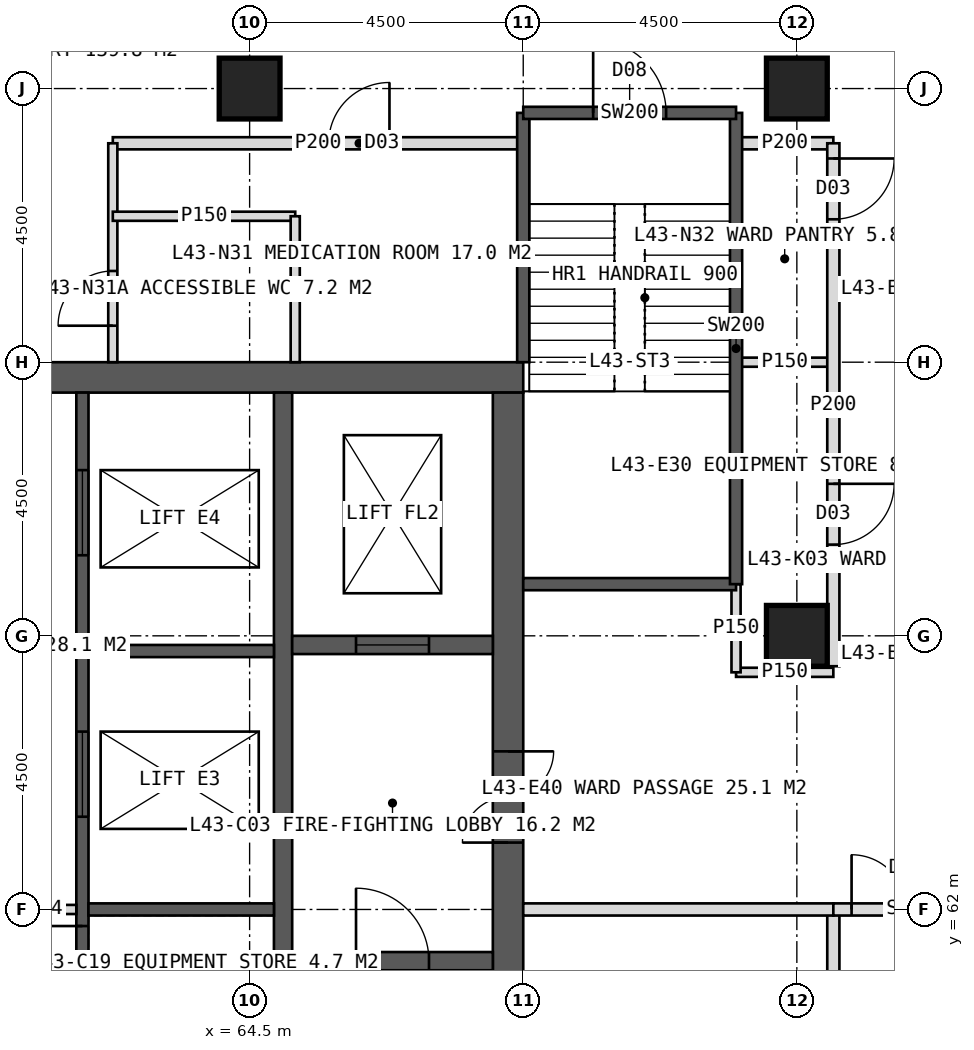
"""IFC4 building model, lengths in metres.
Left out: names, types, materials, properties, quantities, classifications, styles, units other than length and angle.
Written with IfcOpenShell. Run it as: python <this file> out.ifc"""

import sys

from ifc_helpers import new_model, si_unit, direction, frame, frame_2d, origin, origin_2d, place, context, subcontext, project, spatial, rectangle, hollow_rectangle, extrude, element, fill, save


model = new_model("IFC4")
c1 = context("Model", 3, precision=1e-05, world=origin(), true_north=direction((0.0, 1.0)))
c2 = subcontext(c1, "Body", "Model", "MODEL_VIEW")
j1 = project(units=[si_unit("LENGTHUNIT", "METRE"), si_unit("PLANEANGLEUNIT", "RADIAN")], contexts=[c1])
p1 = place(None, origin())
s1 = spatial("IfcSite", under=j1, at=p1, CompositionType="ELEMENT")
p2 = place(p1, origin())
s2 = spatial("IfcBuilding", under=s1, at=p2, CompositionType="ELEMENT")
p3 = place(p2, frame((0.0, 0.0, 181.0)))
s3 = spatial("IfcBuildingStorey", under=s2, at=p3, CompositionType="ELEMENT", Elevation=181.0)
p4 = place(p3, frame((51.0, 70.75, 0.0), z_axis=(0.0, 0.0, 1.0), x_axis=(1.0, 0.0, 0.0)))
e1 = element("IfcWall", 1, at=p4, inside=s3, PredefinedType="SHEAR", context=c2, shape_type="SweptSolid", body=[
    extrude(rectangle(XDim=18.0, YDim=0.5, at=frame_2d((9.0, 0.0))), origin(), (0.0, 0.0, 1.0), 4.0),
])
p5 = place(p4, frame((8.1, 0.0, 0.0)))
e2 = element("IfcOpeningElement", 2, at=p5, cuts=e1, PredefinedType="OPENING", context=c2, shape_type="SweptSolid", body=[
    extrude(rectangle(XDim=1.8, YDim=2.2, at=frame_2d((0.9, 1.1))), frame((0.0, 0.26, 0.0), z_axis=(0.0, -1.0, 0.0), x_axis=(1.0, 0.0, 0.0)), (0.0, 0.0, 1.0), 0.52),
])
p6 = place(p3, frame((68.75, 53.5, 0.0), z_axis=(0.0, 0.0, 1.0), x_axis=(0.0, 1.0, 0.0)))
e3 = element("IfcWall", 3, at=p6, inside=s3, PredefinedType="SHEAR", context=c2, shape_type="SweptSolid", body=[
    extrude(rectangle(XDim=17.0, YDim=0.5, at=frame_2d((8.5, 0.0))), origin(), (0.0, 0.0, 1.0), 4.0),
])
p7 = place(p6, frame((9.6, 0.0, 0.0)))
e4 = element("IfcOpeningElement", 4, at=p7, cuts=e3, PredefinedType="OPENING", context=c2, shape_type="SweptSolid", body=[
    extrude(rectangle(XDim=1.5, YDim=2.2, at=frame_2d((0.75, 1.1))), frame((0.0, 0.26, 0.0), z_axis=(0.0, -1.0, 0.0), x_axis=(1.0, 0.0, 0.0)), (0.0, 0.0, 1.0), 0.52),
])
p8 = place(p3, frame((65.05, 53.5, 0.0), z_axis=(0.0, 0.0, 1.0), x_axis=(0.0, 1.0, 0.0)))
e5 = element("IfcWall", 5, at=p8, inside=s3, PredefinedType="SHEAR", context=c2, shape_type="SweptSolid", body=[
    extrude(rectangle(XDim=17.0, YDim=0.3, at=frame_2d((8.5, 0.0))), origin(), (0.0, 0.0, 1.0), 4.0),
])
p9 = place(p3, frame((61.75, 53.5, 0.0), z_axis=(0.0, 0.0, 1.0), x_axis=(0.0, 1.0, 0.0)))
e6 = element("IfcWall", 6, at=p9, inside=s3, PredefinedType="SHEAR", context=c2, shape_type="SweptSolid", body=[
    extrude(rectangle(XDim=17.0, YDim=0.2, at=frame_2d((8.5, 0.0))), origin(), (0.0, 0.0, 1.0), 4.0),
])
p10 = place(p9, frame((0.393, 0.0, 0.0)))
e7 = element("IfcOpeningElement", 7, at=p10, cuts=e6, PredefinedType="OPENING", context=c2, shape_type="SweptSolid", body=[
    extrude(rectangle(XDim=1.0, YDim=2.1, at=frame_2d((0.5, 1.05))), frame((0.0, 0.11, 0.0), z_axis=(0.0, -1.0, 0.0), x_axis=(1.0, 0.0, 0.0)), (0.0, 0.0, 1.0), 0.22),
])
p11 = place(p9, frame((2.542, 0.0, 0.0)))
e8 = element("IfcOpeningElement", 8, at=p11, cuts=e6, PredefinedType="OPENING", context=c2, shape_type="SweptSolid", body=[
    extrude(rectangle(XDim=1.0, YDim=2.1, at=frame_2d((0.5, 1.05))), frame((0.0, 0.11, 0.0), z_axis=(0.0, -1.0, 0.0), x_axis=(1.0, 0.0, 0.0)), (0.0, 0.0, 1.0), 0.22),
])
p12 = place(p9, frame((5.127, 0.0, 0.0)))
e9 = element("IfcOpeningElement", 9, at=p12, cuts=e6, PredefinedType="OPENING", context=c2, shape_type="SweptSolid", body=[
    extrude(rectangle(XDim=1.0, YDim=2.1, at=frame_2d((0.5, 1.05))), frame((0.0, 0.11, 0.0), z_axis=(0.0, -1.0, 0.0), x_axis=(1.0, 0.0, 0.0)), (0.0, 0.0, 1.0), 0.22),
])
p13 = place(p9, frame((7.228, 0.0, 0.0)))
e10 = element("IfcOpeningElement", 10, at=p13, cuts=e6, PredefinedType="OPENING", context=c2, shape_type="SweptSolid", body=[
    extrude(rectangle(XDim=1.0, YDim=2.1, at=frame_2d((0.5, 1.05))), frame((0.0, 0.11, 0.0), z_axis=(0.0, -1.0, 0.0), x_axis=(1.0, 0.0, 0.0)), (0.0, 0.0, 1.0), 0.22),
])
p14 = place(p9, frame((10.025, 0.0, 0.0)))
e11 = element("IfcOpeningElement", 11, at=p14, cuts=e6, PredefinedType="OPENING", context=c2, shape_type="SweptSolid", body=[
    extrude(rectangle(XDim=1.4, YDim=2.2, at=frame_2d((0.7, 1.1))), frame((0.0, 0.11, 0.0), z_axis=(0.0, -1.0, 0.0), x_axis=(1.0, 0.0, 0.0)), (0.0, 0.0, 1.0), 0.22),
])
p15 = place(p9, frame((14.325, 0.0, 0.0)))
e12 = element("IfcOpeningElement", 12, at=p15, cuts=e6, PredefinedType="OPENING", context=c2, shape_type="SweptSolid", body=[
    extrude(rectangle(XDim=1.4, YDim=2.2, at=frame_2d((0.7, 1.1))), frame((0.0, 0.11, 0.0), z_axis=(0.0, -1.0, 0.0), x_axis=(1.0, 0.0, 0.0)), (0.0, 0.0, 1.0), 0.22),
])
for number, where, z_axis, x_axis in (
    (13, (61.85, 62.0, 0.0), (0.0, 0.0, 1.0), (1.0, 0.0, 0.0)),
    (14, (61.85, 66.25, 0.0), (0.0, 0.0, 1.0), (1.0, 0.0, 0.0)),
):
    element("IfcWall", number, at=place(p3, frame(where, z_axis=z_axis, x_axis=x_axis)), inside=s3, PredefinedType="SHEAR", context=c2, shape_type="SweptSolid", body=[
        extrude(rectangle(XDim=3.05, YDim=0.2, at=frame_2d((1.525, 0.0))), origin(), (0.0, 0.0, 1.0), 4.0),
    ])
p16 = place(p3, frame((65.2, 61.15, 0.0), z_axis=(0.0, 0.0, 1.0), x_axis=(1.0, 0.0, 0.0)))
e15 = element("IfcWall", 15, at=p16, inside=s3, PredefinedType="SHEAR", context=c2, shape_type="SweptSolid", body=[
    extrude(rectangle(XDim=3.3, YDim=0.3, at=frame_2d((1.65, 0.0))), origin(), (0.0, 0.0, 1.0), 4.0),
])
p17 = place(p16, frame((1.05, 0.0, 0.0)))
e16 = element("IfcOpeningElement", 16, at=p17, cuts=e15, PredefinedType="OPENING", context=c2, shape_type="SweptSolid", body=[
    extrude(rectangle(XDim=1.2, YDim=2.1, at=frame_2d((0.6, 1.05))), frame((0.0, 0.16, 0.0), z_axis=(0.0, -1.0, 0.0), x_axis=(1.0, 0.0, 0.0)), (0.0, 0.0, 1.0), 0.32),
])
p18 = place(p3, frame((65.2, 66.35, 0.0), z_axis=(0.0, 0.0, 1.0), x_axis=(1.0, 0.0, 0.0)))
e17 = element("IfcWall", 17, at=p18, inside=s3, PredefinedType="SHEAR", context=c2, shape_type="SweptSolid", body=[
    extrude(rectangle(XDim=3.3, YDim=0.3, at=frame_2d((1.65, 0.0))), origin(), (0.0, 0.0, 1.0), 4.0),
])
p19 = place(p18, frame((1.05, 0.0, 0.0)))
e18 = element("IfcOpeningElement", 18, at=p19, cuts=e17, PredefinedType="OPENING", context=c2, shape_type="SweptSolid", body=[
    extrude(rectangle(XDim=1.2, YDim=2.2, at=frame_2d((0.6, 1.1))), frame((0.0, 0.16, 0.0), z_axis=(0.0, -1.0, 0.0), x_axis=(1.0, 0.0, 0.0)), (0.0, 0.0, 1.0), 0.32),
])
for number, where, z_axis, x_axis in (
    (19, (73.5, 75.5, 0.0), (0.0, 0.0, 1.0), (1.0, 0.0, 0.0)),
    (20, (64.5, 75.5, 0.0), (0.0, 0.0, 1.0), (1.0, 0.0, 0.0)),
    (21, (73.5, 66.5, 0.0), (0.0, 0.0, 1.0), (1.0, 0.0, 0.0)),
):
    element("IfcColumn", number, at=place(p3, frame(where, z_axis=z_axis, x_axis=x_axis)), inside=s3, PredefinedType="COLUMN", context=c2, shape_type="SweptSolid", body=[
        extrude(hollow_rectangle(XDim=1.0, YDim=1.0, WallThickness=0.1, at=origin_2d()), origin(), (0.0, 0.0, 1.0), 4.0),
    ])
p20 = place(p3, frame((62.25, 74.6, 0.0), z_axis=(0.0, 0.0, 1.0), x_axis=(1.0, 0.0, 0.0)))
e22 = element("IfcWall", 22, at=p20, inside=s3, PredefinedType="PARTITIONING", context=c2, shape_type="SweptSolid", body=[
    extrude(rectangle(XDim=6.75, YDim=0.2, at=frame_2d((3.375, 0.0))), origin(), (0.0, 0.0, 1.0), 3.75),
])
p21 = place(p20, frame((3.55, 0.0, 0.0)))
e23 = element("IfcOpeningElement", 23, at=p21, cuts=e22, PredefinedType="OPENING", context=c2, shape_type="SweptSolid", body=[
    extrude(rectangle(XDim=1.0, YDim=2.1, at=frame_2d((0.5, 1.05))), frame((0.0, 0.11, 0.0), z_axis=(0.0, -1.0, 0.0), x_axis=(1.0, 0.0, 0.0)), (0.0, 0.0, 1.0), 0.22),
])
p22 = place(p3, frame((72.5, 74.6, 0.0), z_axis=(0.0, 0.0, 1.0), x_axis=(1.0, 0.0, 0.0)))
e24 = element("IfcWall", 24, at=p22, inside=s3, PredefinedType="PARTITIONING", context=c2, shape_type="SweptSolid", body=[
    extrude(rectangle(XDim=1.6, YDim=0.2, at=frame_2d((0.8, 0.0))), origin(), (0.0, 0.0, 1.0), 3.75),
])
p23 = place(p3, frame((62.25, 71.0, 0.0), z_axis=(0.0, 0.0, 1.0), x_axis=(0.0, 1.0, 0.0)))
e25 = element("IfcWall", 25, at=p23, inside=s3, PredefinedType="PARTITIONING", context=c2, shape_type="SweptSolid", body=[
    extrude(rectangle(XDim=3.6, YDim=0.15, at=frame_2d((1.8, 0.0))), origin(), (0.0, 0.0, 1.0), 3.75),
])
p24 = place(p23, frame((0.6, 0.0, 0.0)))
e26 = element("IfcOpeningElement", 26, at=p24, cuts=e25, PredefinedType="OPENING", context=c2, shape_type="SweptSolid", body=[
    extrude(rectangle(XDim=0.9, YDim=2.1, at=frame_2d((0.45, 1.05))), frame((0.0, 0.085, 0.0), z_axis=(0.0, -1.0, 0.0), x_axis=(1.0, 0.0, 0.0)), (0.0, 0.0, 1.0), 0.17),
])
p25 = place(p3, frame((62.25, 73.4, 0.0), z_axis=(0.0, 0.0, 1.0), x_axis=(1.0, 0.0, 0.0)))
e27 = element("IfcWall", 27, at=p25, inside=s3, PredefinedType="PARTITIONING", context=c2, shape_type="SweptSolid", body=[
    extrude(rectangle(XDim=3.0, YDim=0.15, at=frame_2d((1.5, 0.0))), origin(), (0.0, 0.0, 1.0), 3.75),
])
p26 = place(p3, frame((65.25, 71.0, 0.0), z_axis=(0.0, 0.0, 1.0), x_axis=(0.0, 1.0, 0.0)))
e28 = element("IfcWall", 28, at=p26, inside=s3, PredefinedType="PARTITIONING", context=c2, shape_type="SweptSolid", body=[
    extrude(rectangle(XDim=2.4, YDim=0.15, at=frame_2d((1.2, 0.0))), origin(), (0.0, 0.0, 1.0), 3.75),
])
p27 = place(p3, frame((72.5, 71.0, 0.0), z_axis=(0.0, 0.0, 1.0), x_axis=(1.0, 0.0, 0.0)))
e29 = element("IfcWall", 29, at=p27, inside=s3, PredefinedType="PARTITIONING", context=c2, shape_type="SweptSolid", body=[
    extrude(rectangle(XDim=1.6, YDim=0.15, at=frame_2d((0.8, 0.0))), origin(), (0.0, 0.0, 1.0), 3.75),
])
p28 = place(p3, frame((74.1, 74.6, 0.0), z_axis=(0.0, 0.0, 1.0), x_axis=(0.0, -1.0, 0.0)))
e30 = element("IfcWall", 30, at=p28, inside=s3, PredefinedType="PARTITIONING", context=c2, shape_type="SweptSolid", body=[
    extrude(rectangle(XDim=8.6, YDim=0.2, at=frame_2d((4.3, 0.0))), origin(), (0.0, 0.0, 1.0), 3.75),
])
p29 = place(p28, frame((0.25, 0.0, 0.0)))
e31 = element("IfcOpeningElement", 31, at=p29, cuts=e30, PredefinedType="OPENING", context=c2, shape_type="SweptSolid", body=[
    extrude(rectangle(XDim=1.0, YDim=2.1, at=frame_2d((0.5, 1.05))), frame((0.0, 0.11, 0.0), z_axis=(0.0, -1.0, 0.0), x_axis=(1.0, 0.0, 0.0)), (0.0, 0.0, 1.0), 0.22),
])
p30 = place(p28, frame((5.6, 0.0, 0.0)))
e32 = element("IfcOpeningElement", 32, at=p30, cuts=e30, PredefinedType="OPENING", context=c2, shape_type="SweptSolid", body=[
    extrude(rectangle(XDim=1.0, YDim=2.1, at=frame_2d((0.5, 1.05))), frame((0.0, 0.11, 0.0), z_axis=(0.0, -1.0, 0.0), x_axis=(1.0, 0.0, 0.0)), (0.0, 0.0, 1.0), 0.22),
])
p31 = place(p3, frame((74.1, 62.0, 0.0), z_axis=(0.0, 0.0, 1.0), x_axis=(0.0, -1.0, 0.0)))
e33 = element("IfcWall", 33, at=p31, inside=s3, PredefinedType="PARTITIONING", context=c2, shape_type="SweptSolid", body=[
    extrude(rectangle(XDim=14.1, YDim=0.2, at=frame_2d((7.05, 0.0))), origin(), (0.0, 0.0, 1.0), 3.75),
])
p32 = place(p31, frame((1.45, 0.0, 0.0)))
e34 = element("IfcOpeningElement", 34, at=p32, cuts=e33, PredefinedType="OPENING", context=c2, shape_type="SweptSolid", body=[
    extrude(rectangle(XDim=1.0, YDim=2.1, at=frame_2d((0.5, 1.05))), frame((0.0, 0.11, 0.0), z_axis=(0.0, -1.0, 0.0), x_axis=(1.0, 0.0, 0.0)), (0.0, 0.0, 1.0), 0.22),
])
p33 = place(p31, frame((11.05, 0.0, 0.0)))
e35 = element("IfcOpeningElement", 35, at=p33, cuts=e33, PredefinedType="OPENING", context=c2, shape_type="SweptSolid", body=[
    extrude(rectangle(XDim=1.0, YDim=2.1, at=frame_2d((0.5, 1.05))), frame((0.0, 0.11, 0.0), z_axis=(0.0, -1.0, 0.0), x_axis=(1.0, 0.0, 0.0)), (0.0, 0.0, 1.0), 0.22),
])
p34 = place(p3, frame((72.5, 65.9, 0.0), z_axis=(0.0, 0.0, 1.0), x_axis=(1.0, 0.0, 0.0)))
e36 = element("IfcWall", 36, at=p34, inside=s3, PredefinedType="PARTITIONING", context=c2, shape_type="SweptSolid", body=[
    extrude(rectangle(XDim=1.6, YDim=0.15, at=frame_2d((0.8, 0.0))), origin(), (0.0, 0.0, 1.0), 3.75),
])
p35 = place(p3, frame((69.0, 62.0, 0.0), z_axis=(0.0, 0.0, 1.0), x_axis=(1.0, 0.0, 0.0)))
e37 = element("IfcWall", 37, at=p35, inside=s3, PredefinedType="SOLIDWALL", context=c2, shape_type="SweptSolid", body=[
    extrude(rectangle(XDim=5.1, YDim=0.2, at=frame_2d((2.55, 0.0))), origin(), (0.0, 0.0, 1.0), 2.95),
])
p36 = place(p3, frame((74.1, 62.0, 0.0), z_axis=(0.0, 0.0, 1.0), x_axis=(1.0, 0.0, 0.0)))
e38 = element("IfcWall", 38, at=p36, inside=s3, PredefinedType="SOLIDWALL", context=c2, shape_type="SweptSolid", body=[
    extrude(rectangle(XDim=2.7, YDim=0.2, at=frame_2d((1.35, 0.0))), origin(), (0.0, 0.0, 1.0), 2.95),
])
p37 = place(p36, frame((0.3, 0.0, 0.0)))
e39 = element("IfcOpeningElement", 39, at=p37, cuts=e38, PredefinedType="OPENING", context=c2, shape_type="SweptSolid", body=[
    extrude(rectangle(XDim=1.8, YDim=2.2, at=frame_2d((0.9, 1.1))), frame((0.0, 0.11, 0.0), z_axis=(0.0, -1.0, 0.0), x_axis=(1.0, 0.0, 0.0)), (0.0, 0.0, 1.0), 0.22),
])
p38 = place(p3, frame((58.35, 62.0, 0.0), z_axis=(0.0, 0.0, 1.0), x_axis=(1.0, 0.0, 0.0)))
e40 = element("IfcWall", 40, at=p38, inside=s3, PredefinedType="PARTITIONING", context=c2, shape_type="SweptSolid", body=[
    extrude(rectangle(XDim=3.3, YDim=0.15, at=frame_2d((1.65, 0.0))), origin(), (0.0, 0.0, 1.0), 3.75),
])
p39 = place(p3, frame((72.5, 65.9, 0.0), z_axis=(0.0, 0.0, 1.0), x_axis=(0.0, 1.0, 0.0)))
e41 = element("IfcWall", 41, at=p39, inside=s3, PredefinedType="PARTITIONING", context=c2, shape_type="SweptSolid", body=[
    extrude(rectangle(XDim=1.45, YDim=0.15, at=frame_2d((0.725, 0.0))), origin(), (0.0, 0.0, 1.0), 3.75),
])
p40 = place(p3, frame((69.0, 71.0, 0.0), z_axis=(0.0, 0.0, 1.0), x_axis=(0.0, 1.0, 0.0)))
e42 = element("IfcWall", 42, at=p40, inside=s3, PredefinedType="SOLIDWALL", context=c2, shape_type="SweptSolid", body=[
    extrude(rectangle(XDim=4.1, YDim=0.2, at=frame_2d((2.05, 0.0))), origin(), (0.0, 0.0, 1.0), 3.75),
])
p41 = place(p3, frame((69.0, 67.35, 0.0), z_axis=(0.0, 0.0, 1.0), x_axis=(1.0, 0.0, 0.0)))
e43 = element("IfcWall", 43, at=p41, inside=s3, PredefinedType="SOLIDWALL", context=c2, shape_type="SweptSolid", body=[
    extrude(rectangle(XDim=3.5, YDim=0.2, at=frame_2d((1.75, 0.0))), origin(), (0.0, 0.0, 1.0), 3.75),
])
p42 = place(p3, frame((72.5, 67.35, 0.0), z_axis=(0.0, 0.0, 1.0), x_axis=(0.0, 1.0, 0.0)))
e44 = element("IfcWall", 44, at=p42, inside=s3, PredefinedType="SOLIDWALL", context=c2, shape_type="SweptSolid", body=[
    extrude(rectangle(XDim=7.75, YDim=0.2, at=frame_2d((3.875, 0.0))), origin(), (0.0, 0.0, 1.0), 3.75),
])
p43 = place(p3, frame((69.0, 75.1, 0.0), z_axis=(0.0, 0.0, 1.0), x_axis=(1.0, 0.0, 0.0)))
e45 = element("IfcWall", 45, at=p43, inside=s3, PredefinedType="SOLIDWALL", context=c2, shape_type="SweptSolid", body=[
    extrude(rectangle(XDim=3.5, YDim=0.2, at=frame_2d((1.75, 0.0))), origin(), (0.0, 0.0, 1.0), 3.75),
])
p44 = place(p43, frame((1.15, 0.0, 0.0)))
e46 = element("IfcOpeningElement", 46, at=p44, cuts=e45, PredefinedType="OPENING", context=c2, shape_type="SweptSolid", body=[
    extrude(rectangle(XDim=1.2, YDim=2.1, at=frame_2d((0.6, 1.05))), frame((0.0, 0.11, 0.0), z_axis=(0.0, -1.0, 0.0), x_axis=(1.0, 0.0, 0.0)), (0.0, 0.0, 1.0), 0.22),
])
p45 = place(p24, origin())
e47 = element("IfcDoor", 47, at=p45, inside=s3, OperationType="SINGLE_SWING_LEFT", PredefinedType="DOOR", context=c2, shape_type="SweptSolid", body=[
    extrude(rectangle(XDim=0.9, YDim=2.1, at=frame_2d((0.45, 1.05))), frame((0.0, 0.025, 0.0), z_axis=(0.0, -1.0, 0.0), x_axis=(1.0, 0.0, 0.0)), (0.0, 0.0, 1.0), 0.05),
])
fill(e26, e47)
p46 = place(p21, origin())
e48 = element("IfcDoor", 48, at=p46, inside=s3, OperationType="SINGLE_SWING_RIGHT", PredefinedType="DOOR", context=c2, shape_type="SweptSolid", body=[
    extrude(rectangle(XDim=1.0, YDim=2.1, at=frame_2d((0.5, 1.05))), frame((0.0, 0.025, 0.0), z_axis=(0.0, -1.0, 0.0), x_axis=(1.0, 0.0, 0.0)), (0.0, 0.0, 1.0), 0.05),
])
fill(e23, e48)
p47 = place(p29, origin())
e49 = element("IfcDoor", 49, at=p47, inside=s3, OperationType="SINGLE_SWING_LEFT", PredefinedType="DOOR", context=c2, shape_type="SweptSolid", body=[
    extrude(rectangle(XDim=1.0, YDim=2.1, at=frame_2d((0.5, 1.05))), frame((0.0, 0.025, 0.0), z_axis=(0.0, -1.0, 0.0), x_axis=(1.0, 0.0, 0.0)), (0.0, 0.0, 1.0), 0.05),
])
fill(e31, e49)
p48 = place(p30, origin())
e50 = element("IfcDoor", 50, at=p48, inside=s3, OperationType="SINGLE_SWING_LEFT", PredefinedType="DOOR", context=c2, shape_type="SweptSolid", body=[
    extrude(rectangle(XDim=1.0, YDim=2.1, at=frame_2d((0.5, 1.05))), frame((0.0, 0.025, 0.0), z_axis=(0.0, -1.0, 0.0), x_axis=(1.0, 0.0, 0.0)), (0.0, 0.0, 1.0), 0.05),
])
fill(e32, e50)
p49 = place(p37, origin())
e51 = element("IfcDoor", 51, at=p49, inside=s3, OperationType="DOUBLE_DOOR_DOUBLE_SWING", PredefinedType="DOOR", context=c2, shape_type="SweptSolid", body=[
    extrude(rectangle(XDim=1.8, YDim=2.2, at=frame_2d((0.9, 1.1))), frame((0.0, 0.025, 0.0), z_axis=(0.0, -1.0, 0.0), x_axis=(1.0, 0.0, 0.0)), (0.0, 0.0, 1.0), 0.05),
])
fill(e39, e51)
p50 = place(p7, origin())
e52 = element("IfcDoor", 52, at=p50, inside=s3, OperationType="DOUBLE_DOOR_SINGLE_SWING", PredefinedType="DOOR", context=c2, shape_type="SweptSolid", body=[
    extrude(rectangle(XDim=1.5, YDim=2.2, at=frame_2d((0.75, 1.1))), frame((0.0, 0.025, 0.0), z_axis=(0.0, -1.0, 0.0), x_axis=(1.0, 0.0, 0.0)), (0.0, 0.0, 1.0), 0.05),
])
fill(e4, e52)
p51 = place(p17, origin())
e53 = element("IfcDoor", 53, at=p51, inside=s3, OperationType="SINGLE_SWING_LEFT", PredefinedType="DOOR", context=c2, shape_type="SweptSolid", body=[
    extrude(rectangle(XDim=1.2, YDim=2.1, at=frame_2d((0.6, 1.05))), frame((0.0, 0.025, 0.0), z_axis=(0.0, -1.0, 0.0), x_axis=(1.0, 0.0, 0.0)), (0.0, 0.0, 1.0), 0.05),
])
fill(e16, e53)
p52 = place(p19, origin())
e54 = element("IfcDoor", 54, at=p52, inside=s3, OperationType="SLIDING_TO_LEFT", PredefinedType="DOOR", context=c2, shape_type="SweptSolid", body=[
    extrude(rectangle(XDim=1.2, YDim=2.2, at=frame_2d((0.6, 1.1))), frame((0.0, 0.025, 0.0), z_axis=(0.0, -1.0, 0.0), x_axis=(1.0, 0.0, 0.0)), (0.0, 0.0, 1.0), 0.05),
])
fill(e18, e54)
p53 = place(p13, origin())
e55 = element("IfcDoor", 55, at=p53, inside=s3, OperationType="SINGLE_SWING_RIGHT", PredefinedType="DOOR", context=c2, shape_type="SweptSolid", body=[
    extrude(rectangle(XDim=1.0, YDim=2.1, at=frame_2d((0.5, 1.05))), frame((0.0, 0.025, 0.0), z_axis=(0.0, -1.0, 0.0), x_axis=(1.0, 0.0, 0.0)), (0.0, 0.0, 1.0), 0.05),
])
fill(e10, e55)
p54 = place(p14, origin())
e56 = element("IfcDoor", 56, at=p54, inside=s3, OperationType="SLIDING_TO_LEFT", PredefinedType="DOOR", context=c2, shape_type="SweptSolid", body=[
    extrude(rectangle(XDim=1.4, YDim=2.2, at=frame_2d((0.7, 1.1))), frame((0.0, 0.025, 0.0), z_axis=(0.0, -1.0, 0.0), x_axis=(1.0, 0.0, 0.0)), (0.0, 0.0, 1.0), 0.05),
])
fill(e11, e56)
p55 = place(p15, origin())
e57 = element("IfcDoor", 57, at=p55, inside=s3, OperationType="SLIDING_TO_LEFT", PredefinedType="DOOR", context=c2, shape_type="SweptSolid", body=[
    extrude(rectangle(XDim=1.4, YDim=2.2, at=frame_2d((0.7, 1.1))), frame((0.0, 0.025, 0.0), z_axis=(0.0, -1.0, 0.0), x_axis=(1.0, 0.0, 0.0)), (0.0, 0.0, 1.0), 0.05),
])
fill(e12, e57)
p56 = place(p44, origin())
e58 = element("IfcDoor", 58, at=p56, inside=s3, OperationType="SINGLE_SWING_LEFT", PredefinedType="DOOR", context=c2, shape_type="SweptSolid", body=[
    extrude(rectangle(XDim=1.2, YDim=2.1, at=frame_2d((0.6, 1.05))), frame((0.0, 0.025, 0.0), z_axis=(0.0, -1.0, 0.0), x_axis=(1.0, 0.0, 0.0)), (0.0, 0.0, 1.0), 0.05),
])
fill(e46, e58)
save(model, sys.argv[1])
